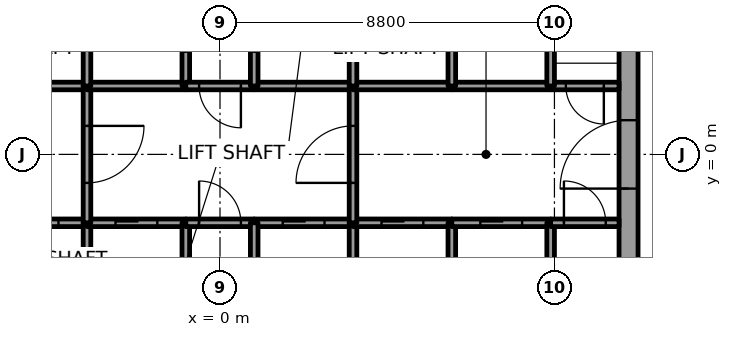
"""IFC4 building model, lengths in metres.
Left out: names, types, materials, properties, quantities, classifications, styles, units other than length and angle.
Written with IfcOpenShell. Run it as: python <this file> out.ifc"""

import sys

from ifc_helpers import new_model, si_unit, direction, frame, frame_2d, origin, place, context, subcontext, project, spatial, rectangle, extrude, element, fill, save


model = new_model("IFC4")
c1 = context("Model", 3, precision=1e-05, world=origin(), true_north=direction((0.0, 1.0)))
c2 = subcontext(c1, "Body", "Model", "MODEL_VIEW")
j1 = project(units=[si_unit("LENGTHUNIT", "METRE"), si_unit("PLANEANGLEUNIT", "RADIAN")], contexts=[c1])
p1 = place(None, origin())
s1 = spatial("IfcSite", under=j1, at=p1, CompositionType="ELEMENT")
p2 = place(p1, origin())
s2 = spatial("IfcBuilding", under=s1, at=p2, CompositionType="ELEMENT")
p3 = place(p2, frame((0.0, 0.0, 66.5)))
s3 = spatial("IfcBuildingStorey", under=s2, at=p3, CompositionType="ELEMENT", Elevation=66.5)
p4 = place(p3, frame((10.75, -7.5, 0.0), z_axis=(0.0, 0.0, 1.0), x_axis=(0.0, 1.0, 0.0)))
e1 = element("IfcWall", 1, at=p4, inside=s3, PredefinedType="SHEAR", context=c2, shape_type="SweptSolid", body=[
    extrude(rectangle(XDim=15.0, YDim=0.5, at=frame_2d((7.5, 0.0))), origin(), (0.0, 0.0, 1.0), 3.7),
])
p5 = place(p4, frame((6.6, 0.0, 0.0)))
e2 = element("IfcOpeningElement", 2, at=p5, cuts=e1, PredefinedType="OPENING", context=c2, shape_type="SweptSolid", body=[
    extrude(rectangle(XDim=1.8, YDim=2.1, at=frame_2d((0.9, 1.05))), frame((0.0, 0.25, 0.0), z_axis=(0.0, -1.0, 0.0), x_axis=(1.0, 0.0, 0.0)), (0.0, 0.0, 1.0), 0.5),
])
p6 = place(p3, frame((-6.1, -1.8, 0.0), z_axis=(0.0, 0.0, 1.0), x_axis=(1.0, 0.0, 0.0)))
e3 = element("IfcWall", 3, at=p6, inside=s3, PredefinedType="SOLIDWALL", context=c2, shape_type="SweptSolid", body=[
    extrude(rectangle(XDim=2.6, YDim=0.2, at=frame_2d((1.3, 0.0))), origin(), (0.0, 0.0, 1.0), 3.55),
])
p7 = place(p6, frame((0.75, 0.0, 0.0)))
e4 = element("IfcOpeningElement", 4, at=p7, cuts=e3, PredefinedType="OPENING", context=c2, shape_type="SweptSolid", body=[
    extrude(rectangle(XDim=1.1, YDim=2.1, at=frame_2d((0.55, 1.05))), frame((0.0, 0.1, 0.0), z_axis=(0.0, -1.0, 0.0), x_axis=(1.0, 0.0, 0.0)), (0.0, 0.0, 1.0), 0.2),
])
p8 = place(p3, frame((-3.5, 1.8, 0.0), z_axis=(0.0, 0.0, 1.0), x_axis=(-1.0, 0.0, 0.0)))
e5 = element("IfcWall", 5, at=p8, inside=s3, PredefinedType="SOLIDWALL", context=c2, shape_type="SweptSolid", body=[
    extrude(rectangle(XDim=2.6, YDim=0.2, at=frame_2d((1.3, 0.0))), origin(), (0.0, 0.0, 1.0), 3.55),
])
p9 = place(p3, frame((-3.5, -4.6, 0.0), z_axis=(0.0, 0.0, 1.0), x_axis=(0.0, 1.0, 0.0)))
e6 = element("IfcWall", 6, at=p9, inside=s3, PredefinedType="SOLIDWALL", context=c2, shape_type="SweptSolid", body=[
    extrude(rectangle(XDim=2.8, YDim=0.2, at=frame_2d((1.4, 0.0))), origin(), (0.0, 0.0, 1.0), 3.55),
])
p10 = place(p3, frame((-3.5, -1.8, 0.0), z_axis=(0.0, 0.0, 1.0), x_axis=(1.0, 0.0, 0.0)))
e7 = element("IfcWall", 7, at=p10, inside=s3, PredefinedType="SOLIDWALL", context=c2, shape_type="SweptSolid", body=[
    extrude(rectangle(XDim=2.6, YDim=0.2, at=frame_2d((1.3, 0.0))), origin(), (0.0, 0.0, 1.0), 3.55),
])
p11 = place(p10, frame((0.75, 0.0, 0.0)))
e8 = element("IfcOpeningElement", 8, at=p11, cuts=e7, PredefinedType="OPENING", context=c2, shape_type="SweptSolid", body=[
    extrude(rectangle(XDim=1.1, YDim=2.1, at=frame_2d((0.55, 1.05))), frame((0.0, 0.1, 0.0), z_axis=(0.0, -1.0, 0.0), x_axis=(1.0, 0.0, 0.0)), (0.0, 0.0, 1.0), 0.2),
])
p12 = place(p3, frame((-3.5, 1.8, 0.0), z_axis=(0.0, 0.0, 1.0), x_axis=(0.0, -1.0, 0.0)))
e9 = element("IfcWall", 9, at=p12, inside=s3, PredefinedType="SOLIDWALL", context=c2, shape_type="SweptSolid", body=[
    extrude(rectangle(XDim=3.6, YDim=0.2, at=frame_2d((1.8, 0.0))), origin(), (0.0, 0.0, 1.0), 3.55),
])
p13 = place(p12, frame((1.05, 0.0, 0.0)))
e10 = element("IfcOpeningElement", 10, at=p13, cuts=e9, PredefinedType="OPENING", context=c2, shape_type="SweptSolid", body=[
    extrude(rectangle(XDim=1.5, YDim=2.1, at=frame_2d((0.75, 1.05))), frame((0.0, 0.1, 0.0), z_axis=(0.0, -1.0, 0.0), x_axis=(1.0, 0.0, 0.0)), (0.0, 0.0, 1.0), 0.2),
])
p14 = place(p3, frame((-0.9, 1.8, 0.0), z_axis=(0.0, 0.0, 1.0), x_axis=(-1.0, 0.0, 0.0)))
e11 = element("IfcWall", 11, at=p14, inside=s3, PredefinedType="SOLIDWALL", context=c2, shape_type="SweptSolid", body=[
    extrude(rectangle(XDim=2.6, YDim=0.2, at=frame_2d((1.3, 0.0))), origin(), (0.0, 0.0, 1.0), 3.55),
])
p15 = place(p3, frame((-3.5, 4.6, 0.0), z_axis=(0.0, 0.0, 1.0), x_axis=(0.0, -1.0, 0.0)))
e12 = element("IfcWall", 12, at=p15, inside=s3, PredefinedType="SOLIDWALL", context=c2, shape_type="SweptSolid", body=[
    extrude(rectangle(XDim=2.8, YDim=0.2, at=frame_2d((1.4, 0.0))), origin(), (0.0, 0.0, 1.0), 3.55),
])
p16 = place(p3, frame((-0.9, 1.8, 0.0), z_axis=(0.0, 0.0, 1.0), x_axis=(0.0, 1.0, 0.0)))
e13 = element("IfcWall", 13, at=p16, inside=s3, PredefinedType="SOLIDWALL", context=c2, shape_type="SweptSolid", body=[
    extrude(rectangle(XDim=3.0, YDim=0.2, at=frame_2d((1.5, 0.0))), origin(), (0.0, 0.0, 1.0), 3.55),
])
p17 = place(p16, frame((0.9, 0.0, 0.0)))
e14 = element("IfcOpeningElement", 14, at=p17, cuts=e13, PredefinedType="OPENING", context=c2, shape_type="SweptSolid", body=[
    extrude(rectangle(XDim=1.2, YDim=2.1, at=frame_2d((0.6, 1.05))), frame((0.0, 0.1, 0.0), z_axis=(0.0, -1.0, 0.0), x_axis=(1.0, 0.0, 0.0)), (0.0, 0.0, 1.0), 0.2),
])
p18 = place(p3, frame((-0.9, -4.6, 0.0), z_axis=(0.0, 0.0, 1.0), x_axis=(0.0, 1.0, 0.0)))
e15 = element("IfcWall", 15, at=p18, inside=s3, PredefinedType="SOLIDWALL", context=c2, shape_type="SweptSolid", body=[
    extrude(rectangle(XDim=2.8, YDim=0.2, at=frame_2d((1.4, 0.0))), origin(), (0.0, 0.0, 1.0), 3.55),
])
p19 = place(p3, frame((-0.9, -1.8, 0.0), z_axis=(0.0, 0.0, 1.0), x_axis=(1.0, 0.0, 0.0)))
e16 = element("IfcWall", 16, at=p19, inside=s3, PredefinedType="SOLIDWALL", context=c2, shape_type="SweptSolid", body=[
    extrude(rectangle(XDim=1.8, YDim=0.2, at=frame_2d((0.9, 0.0))), origin(), (0.0, 0.0, 1.0), 3.55),
])
p20 = place(p19, frame((0.35, 0.0, 0.0)))
e17 = element("IfcOpeningElement", 17, at=p20, cuts=e16, PredefinedType="OPENING", context=c2, shape_type="SweptSolid", body=[
    extrude(rectangle(XDim=1.1, YDim=2.1, at=frame_2d((0.55, 1.05))), frame((0.0, 0.1, 0.0), z_axis=(0.0, -1.0, 0.0), x_axis=(1.0, 0.0, 0.0)), (0.0, 0.0, 1.0), 0.2),
])
p21 = place(p3, frame((0.9, 1.8, 0.0), z_axis=(0.0, 0.0, 1.0), x_axis=(-1.0, 0.0, 0.0)))
e18 = element("IfcWall", 18, at=p21, inside=s3, PredefinedType="SOLIDWALL", context=c2, shape_type="SweptSolid", body=[
    extrude(rectangle(XDim=1.8, YDim=0.2, at=frame_2d((0.9, 0.0))), origin(), (0.0, 0.0, 1.0), 3.55),
])
p22 = place(p21, frame((0.35, 0.0, 0.0)))
e19 = element("IfcOpeningElement", 19, at=p22, cuts=e18, PredefinedType="OPENING", context=c2, shape_type="SweptSolid", body=[
    extrude(rectangle(XDim=1.1, YDim=2.1, at=frame_2d((0.55, 1.05))), frame((0.0, 0.1, 0.0), z_axis=(0.0, -1.0, 0.0), x_axis=(1.0, 0.0, 0.0)), (0.0, 0.0, 1.0), 0.2),
])
p23 = place(p3, frame((0.9, -1.8, 0.0), z_axis=(0.0, 0.0, 1.0), x_axis=(1.0, 0.0, 0.0)))
e20 = element("IfcWall", 20, at=p23, inside=s3, PredefinedType="SOLIDWALL", context=c2, shape_type="SweptSolid", body=[
    extrude(rectangle(XDim=2.6, YDim=0.2, at=frame_2d((1.3, 0.0))), origin(), (0.0, 0.0, 1.0), 3.55),
])
p24 = place(p23, frame((0.75, 0.0, 0.0)))
e21 = element("IfcOpeningElement", 21, at=p24, cuts=e20, PredefinedType="OPENING", context=c2, shape_type="SweptSolid", body=[
    extrude(rectangle(XDim=1.1, YDim=2.1, at=frame_2d((0.55, 1.05))), frame((0.0, 0.1, 0.0), z_axis=(0.0, -1.0, 0.0), x_axis=(1.0, 0.0, 0.0)), (0.0, 0.0, 1.0), 0.2),
])
p25 = place(p3, frame((0.9, -1.8, 0.0), z_axis=(0.0, 0.0, 1.0), x_axis=(0.0, -1.0, 0.0)))
e22 = element("IfcWall", 22, at=p25, inside=s3, PredefinedType="SOLIDWALL", context=c2, shape_type="SweptSolid", body=[
    extrude(rectangle(XDim=2.8, YDim=0.2, at=frame_2d((1.4, 0.0))), origin(), (0.0, 0.0, 1.0), 3.55),
])
p26 = place(p3, frame((3.5, 1.8, 0.0), z_axis=(0.0, 0.0, 1.0), x_axis=(-1.0, 0.0, 0.0)))
e23 = element("IfcWall", 23, at=p26, inside=s3, PredefinedType="SOLIDWALL", context=c2, shape_type="SweptSolid", body=[
    extrude(rectangle(XDim=2.6, YDim=0.2, at=frame_2d((1.3, 0.0))), origin(), (0.0, 0.0, 1.0), 3.55),
])
p27 = place(p3, frame((0.9, 4.8, 0.0), z_axis=(0.0, 0.0, 1.0), x_axis=(0.0, -1.0, 0.0)))
e24 = element("IfcWall", 24, at=p27, inside=s3, PredefinedType="SOLIDWALL", context=c2, shape_type="SweptSolid", body=[
    extrude(rectangle(XDim=3.0, YDim=0.2, at=frame_2d((1.5, 0.0))), origin(), (0.0, 0.0, 1.0), 3.55),
])
p28 = place(p27, frame((0.9, 0.0, 0.0)))
e25 = element("IfcOpeningElement", 25, at=p28, cuts=e24, PredefinedType="OPENING", context=c2, shape_type="SweptSolid", body=[
    extrude(rectangle(XDim=1.2, YDim=2.1, at=frame_2d((0.6, 1.05))), frame((0.0, 0.1, 0.0), z_axis=(0.0, -1.0, 0.0), x_axis=(1.0, 0.0, 0.0)), (0.0, 0.0, 1.0), 0.2),
])
p29 = place(p3, frame((3.5, -4.6, 0.0), z_axis=(0.0, 0.0, 1.0), x_axis=(0.0, 1.0, 0.0)))
e26 = element("IfcWall", 26, at=p29, inside=s3, PredefinedType="SOLIDWALL", context=c2, shape_type="SweptSolid", body=[
    extrude(rectangle(XDim=2.8, YDim=0.2, at=frame_2d((1.4, 0.0))), origin(), (0.0, 0.0, 1.0), 3.55),
])
p30 = place(p3, frame((3.5, -1.8, 0.0), z_axis=(0.0, 0.0, 1.0), x_axis=(1.0, 0.0, 0.0)))
e27 = element("IfcWall", 27, at=p30, inside=s3, PredefinedType="SOLIDWALL", context=c2, shape_type="SweptSolid", body=[
    extrude(rectangle(XDim=2.6, YDim=0.2, at=frame_2d((1.3, 0.0))), origin(), (0.0, 0.0, 1.0), 3.55),
])
p31 = place(p30, frame((0.75, 0.0, 0.0)))
e28 = element("IfcOpeningElement", 28, at=p31, cuts=e27, PredefinedType="OPENING", context=c2, shape_type="SweptSolid", body=[
    extrude(rectangle(XDim=1.1, YDim=2.1, at=frame_2d((0.55, 1.05))), frame((0.0, 0.1, 0.0), z_axis=(0.0, -1.0, 0.0), x_axis=(1.0, 0.0, 0.0)), (0.0, 0.0, 1.0), 0.2),
])
p32 = place(p3, frame((3.5, -1.8, 0.0), z_axis=(0.0, 0.0, 1.0), x_axis=(0.0, 1.0, 0.0)))
e29 = element("IfcWall", 29, at=p32, inside=s3, PredefinedType="SOLIDWALL", context=c2, shape_type="SweptSolid", body=[
    extrude(rectangle(XDim=3.6, YDim=0.2, at=frame_2d((1.8, 0.0))), origin(), (0.0, 0.0, 1.0), 3.55),
])
p33 = place(p32, frame((1.05, 0.0, 0.0)))
e30 = element("IfcOpeningElement", 30, at=p33, cuts=e29, PredefinedType="OPENING", context=c2, shape_type="SweptSolid", body=[
    extrude(rectangle(XDim=1.5, YDim=2.1, at=frame_2d((0.75, 1.05))), frame((0.0, 0.1, 0.0), z_axis=(0.0, -1.0, 0.0), x_axis=(1.0, 0.0, 0.0)), (0.0, 0.0, 1.0), 0.2),
])
p34 = place(p3, frame((6.1, 1.8, 0.0), z_axis=(0.0, 0.0, 1.0), x_axis=(-1.0, 0.0, 0.0)))
e31 = element("IfcWall", 31, at=p34, inside=s3, PredefinedType="SOLIDWALL", context=c2, shape_type="SweptSolid", body=[
    extrude(rectangle(XDim=2.6, YDim=0.2, at=frame_2d((1.3, 0.0))), origin(), (0.0, 0.0, 1.0), 3.55),
])
for number, where, z_axis, x_axis in (
    (32, (3.5, 1.8, 0.0), (0.0, 0.0, 1.0), (0.0, 1.0, 0.0)),
    (33, (6.1, -4.6, 0.0), (0.0, 0.0, 1.0), (0.0, 1.0, 0.0)),
):
    element("IfcWall", number, at=place(p3, frame(where, z_axis=z_axis, x_axis=x_axis)), inside=s3, PredefinedType="SOLIDWALL", context=c2, shape_type="SweptSolid", body=[
        extrude(rectangle(XDim=2.8, YDim=0.2, at=frame_2d((1.4, 0.0))), origin(), (0.0, 0.0, 1.0), 3.55),
    ])
p35 = place(p3, frame((6.1, -1.8, 0.0), z_axis=(0.0, 0.0, 1.0), x_axis=(1.0, 0.0, 0.0)))
e34 = element("IfcWall", 34, at=p35, inside=s3, PredefinedType="SOLIDWALL", context=c2, shape_type="SweptSolid", body=[
    extrude(rectangle(XDim=2.6, YDim=0.2, at=frame_2d((1.3, 0.0))), origin(), (0.0, 0.0, 1.0), 3.55),
])
p36 = place(p35, frame((0.75, 0.0, 0.0)))
e35 = element("IfcOpeningElement", 35, at=p36, cuts=e34, PredefinedType="OPENING", context=c2, shape_type="SweptSolid", body=[
    extrude(rectangle(XDim=1.1, YDim=2.1, at=frame_2d((0.55, 1.05))), frame((0.0, 0.1, 0.0), z_axis=(0.0, -1.0, 0.0), x_axis=(1.0, 0.0, 0.0)), (0.0, 0.0, 1.0), 0.2),
])
p37 = place(p3, frame((8.7, 1.8, 0.0), z_axis=(0.0, 0.0, 1.0), x_axis=(-1.0, 0.0, 0.0)))
e36 = element("IfcWall", 36, at=p37, inside=s3, PredefinedType="SOLIDWALL", context=c2, shape_type="SweptSolid", body=[
    extrude(rectangle(XDim=2.6, YDim=0.2, at=frame_2d((1.3, 0.0))), origin(), (0.0, 0.0, 1.0), 3.55),
])
for number, where, z_axis, x_axis in (
    (37, (6.1, 1.8, 0.0), (0.0, 0.0, 1.0), (0.0, 1.0, 0.0)),
    (38, (8.7, -1.8, 0.0), (0.0, 0.0, 1.0), (0.0, -1.0, 0.0)),
):
    element("IfcWall", number, at=place(p3, frame(where, z_axis=z_axis, x_axis=x_axis)), inside=s3, PredefinedType="SOLIDWALL", context=c2, shape_type="SweptSolid", body=[
        extrude(rectangle(XDim=2.8, YDim=0.2, at=frame_2d((1.4, 0.0))), origin(), (0.0, 0.0, 1.0), 3.55),
    ])
p38 = place(p3, frame((8.7, -1.8, 0.0), z_axis=(0.0, 0.0, 1.0), x_axis=(1.0, 0.0, 0.0)))
e39 = element("IfcWall", 39, at=p38, inside=s3, PredefinedType="SOLIDWALL", context=c2, shape_type="SweptSolid", body=[
    extrude(rectangle(XDim=1.8, YDim=0.2, at=frame_2d((0.9, 0.0))), origin(), (0.0, 0.0, 1.0), 3.55),
])
p39 = place(p38, frame((0.35, 0.0, 0.0)))
e40 = element("IfcOpeningElement", 40, at=p39, cuts=e39, PredefinedType="OPENING", context=c2, shape_type="SweptSolid", body=[
    extrude(rectangle(XDim=1.1, YDim=2.1, at=frame_2d((0.55, 1.05))), frame((0.0, 0.1, 0.0), z_axis=(0.0, -1.0, 0.0), x_axis=(1.0, 0.0, 0.0)), (0.0, 0.0, 1.0), 0.2),
])
p40 = place(p3, frame((10.5, 1.8, 0.0), z_axis=(0.0, 0.0, 1.0), x_axis=(-1.0, 0.0, 0.0)))
e41 = element("IfcWall", 41, at=p40, inside=s3, PredefinedType="SOLIDWALL", context=c2, shape_type="SweptSolid", body=[
    extrude(rectangle(XDim=1.8, YDim=0.2, at=frame_2d((0.9, 0.0))), origin(), (0.0, 0.0, 1.0), 3.55),
])
p41 = place(p40, frame((0.4, 0.0, 0.0)))
e42 = element("IfcOpeningElement", 42, at=p41, cuts=e41, PredefinedType="OPENING", context=c2, shape_type="SweptSolid", body=[
    extrude(rectangle(XDim=1.0, YDim=2.1, at=frame_2d((0.5, 1.05))), frame((0.0, 0.1, 0.0), z_axis=(0.0, -1.0, 0.0), x_axis=(1.0, 0.0, 0.0)), (0.0, 0.0, 1.0), 0.2),
])
p42 = place(p3, frame((8.7, 4.6, 0.0), z_axis=(0.0, 0.0, 1.0), x_axis=(0.0, -1.0, 0.0)))
e43 = element("IfcWall", 43, at=p42, inside=s3, PredefinedType="SOLIDWALL", context=c2, shape_type="SweptSolid", body=[
    extrude(rectangle(XDim=2.8, YDim=0.2, at=frame_2d((1.4, 0.0))), origin(), (0.0, 0.0, 1.0), 3.55),
])
p43 = place(p7, origin())
e44 = element("IfcDoor", 44, at=p43, inside=s3, OperationType="SLIDING_TO_LEFT", PredefinedType="DOOR", context=c2, shape_type="SweptSolid", body=[
    extrude(rectangle(XDim=1.1, YDim=2.1, at=frame_2d((0.55, 1.05))), frame((0.0, 0.025, 0.0), z_axis=(0.0, -1.0, 0.0), x_axis=(1.0, 0.0, 0.0)), (0.0, 0.0, 1.0), 0.05),
])
fill(e4, e44)
p44 = place(p11, origin())
e45 = element("IfcDoor", 45, at=p44, inside=s3, OperationType="SLIDING_TO_RIGHT", PredefinedType="DOOR", context=c2, shape_type="SweptSolid", body=[
    extrude(rectangle(XDim=1.1, YDim=2.1, at=frame_2d((0.55, 1.05))), frame((0.0, 0.025, 0.0), z_axis=(0.0, -1.0, 0.0), x_axis=(1.0, 0.0, 0.0)), (0.0, 0.0, 1.0), 0.05),
])
fill(e8, e45)
p45 = place(p24, origin())
e46 = element("IfcDoor", 46, at=p45, inside=s3, OperationType="SLIDING_TO_RIGHT", PredefinedType="DOOR", context=c2, shape_type="SweptSolid", body=[
    extrude(rectangle(XDim=1.1, YDim=2.1, at=frame_2d((0.55, 1.05))), frame((0.0, 0.025, 0.0), z_axis=(0.0, -1.0, 0.0), x_axis=(1.0, 0.0, 0.0)), (0.0, 0.0, 1.0), 0.05),
])
fill(e21, e46)
p46 = place(p31, origin())
e47 = element("IfcDoor", 47, at=p46, inside=s3, OperationType="SLIDING_TO_LEFT", PredefinedType="DOOR", context=c2, shape_type="SweptSolid", body=[
    extrude(rectangle(XDim=1.1, YDim=2.1, at=frame_2d((0.55, 1.05))), frame((0.0, 0.025, 0.0), z_axis=(0.0, -1.0, 0.0), x_axis=(1.0, 0.0, 0.0)), (0.0, 0.0, 1.0), 0.05),
])
fill(e28, e47)
p47 = place(p36, origin())
e48 = element("IfcDoor", 48, at=p47, inside=s3, OperationType="SLIDING_TO_LEFT", PredefinedType="DOOR", context=c2, shape_type="SweptSolid", body=[
    extrude(rectangle(XDim=1.1, YDim=2.1, at=frame_2d((0.55, 1.05))), frame((0.0, 0.025, 0.0), z_axis=(0.0, -1.0, 0.0), x_axis=(1.0, 0.0, 0.0)), (0.0, 0.0, 1.0), 0.05),
])
fill(e35, e48)
p48 = place(p13, origin())
e49 = element("IfcDoor", 49, at=p48, inside=s3, OperationType="DOUBLE_DOOR_SINGLE_SWING", PredefinedType="DOOR", context=c2, shape_type="SweptSolid", body=[
    extrude(rectangle(XDim=1.5, YDim=2.1, at=frame_2d((0.75, 1.05))), frame((0.0, 0.025, 0.0), z_axis=(0.0, -1.0, 0.0), x_axis=(1.0, 0.0, 0.0)), (0.0, 0.0, 1.0), 0.05),
])
fill(e10, e49)
p49 = place(p33, origin())
e50 = element("IfcDoor", 50, at=p49, inside=s3, OperationType="DOUBLE_DOOR_SINGLE_SWING", PredefinedType="DOOR", context=c2, shape_type="SweptSolid", body=[
    extrude(rectangle(XDim=1.5, YDim=2.1, at=frame_2d((0.75, 1.05))), frame((0.0, 0.025, 0.0), z_axis=(0.0, -1.0, 0.0), x_axis=(1.0, 0.0, 0.0)), (0.0, 0.0, 1.0), 0.05),
])
fill(e30, e50)
p50 = place(p39, origin())
e51 = element("IfcDoor", 51, at=p50, inside=s3, OperationType="SINGLE_SWING_LEFT", PredefinedType="DOOR", context=c2, shape_type="SweptSolid", body=[
    extrude(rectangle(XDim=1.1, YDim=2.1, at=frame_2d((0.55, 1.05))), frame((0.0, 0.025, 0.0), z_axis=(0.0, -1.0, 0.0), x_axis=(1.0, 0.0, 0.0)), (0.0, 0.0, 1.0), 0.05),
])
fill(e40, e51)
p51 = place(p22, origin())
e52 = element("IfcDoor", 52, at=p51, inside=s3, OperationType="SINGLE_SWING_LEFT", PredefinedType="DOOR", context=c2, shape_type="SweptSolid", body=[
    extrude(rectangle(XDim=1.1, YDim=2.1, at=frame_2d((0.55, 1.05))), frame((0.0, 0.025, 0.0), z_axis=(0.0, -1.0, 0.0), x_axis=(1.0, 0.0, 0.0)), (0.0, 0.0, 1.0), 0.05),
])
fill(e19, e52)
p52 = place(p20, origin())
e53 = element("IfcDoor", 53, at=p52, inside=s3, OperationType="SINGLE_SWING_RIGHT", PredefinedType="DOOR", context=c2, shape_type="SweptSolid", body=[
    extrude(rectangle(XDim=1.1, YDim=2.1, at=frame_2d((0.55, 1.05))), frame((0.0, 0.025, 0.0), z_axis=(0.0, -1.0, 0.0), x_axis=(1.0, 0.0, 0.0)), (0.0, 0.0, 1.0), 0.05),
])
fill(e17, e53)
p53 = place(p41, origin())
e54 = element("IfcDoor", 54, at=p53, inside=s3, OperationType="SINGLE_SWING_RIGHT", PredefinedType="DOOR", context=c2, shape_type="SweptSolid", body=[
    extrude(rectangle(XDim=1.0, YDim=2.1, at=frame_2d((0.5, 1.05))), frame((0.0, 0.025, 0.0), z_axis=(0.0, -1.0, 0.0), x_axis=(1.0, 0.0, 0.0)), (0.0, 0.0, 1.0), 0.05),
])
fill(e42, e54)
p54 = place(p5, origin())
e55 = element("IfcDoor", 55, at=p54, inside=s3, OperationType="DOUBLE_DOOR_SINGLE_SWING", PredefinedType="DOOR", context=c2, shape_type="SweptSolid", body=[
    extrude(rectangle(XDim=1.8, YDim=2.1, at=frame_2d((0.9, 1.05))), frame((0.0, 0.025, 0.0), z_axis=(0.0, -1.0, 0.0), x_axis=(1.0, 0.0, 0.0)), (0.0, 0.0, 1.0), 0.05),
])
fill(e2, e55)
save(model, sys.argv[1])
